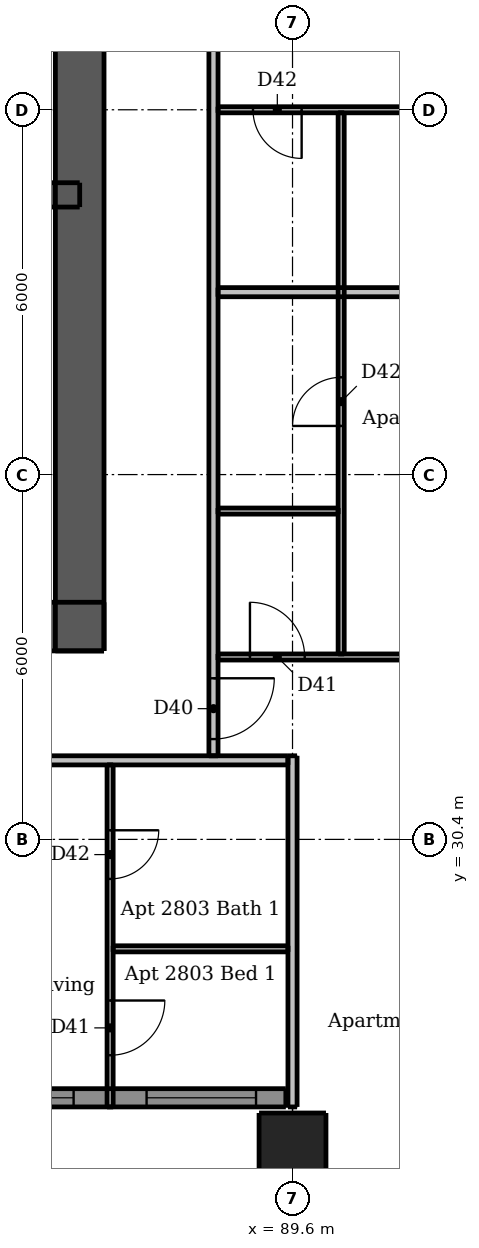
"""IFC4 building model, lengths in metres.
Left out: names, types, materials, properties, quantities, classifications, styles, units other than length and angle.
Written with IfcOpenShell. Run it as: python <this file> out.ifc"""

import sys

from ifc_helpers import new_model, si_unit, direction, frame, frame_2d, origin, origin_2d, place, context, subcontext, project, spatial, rectangle, extrude, element, fill, save


model = new_model("IFC4")
c1 = context("Model", 3, precision=1e-05, world=origin(), true_north=direction((0.0, 1.0)))
c2 = subcontext(c1, "Body", "Model", "MODEL_VIEW")
j1 = project(units=[si_unit("LENGTHUNIT", "METRE"), si_unit("PLANEANGLEUNIT", "RADIAN")], contexts=[c1])
p1 = place(None, origin())
s1 = spatial("IfcSite", under=j1, at=p1, CompositionType="ELEMENT")
p2 = place(p1, origin())
s2 = spatial("IfcBuilding", under=s1, at=p2, CompositionType="ELEMENT")
p3 = place(p2, frame((0.0, 0.0, 105.1)))
s3 = spatial("IfcBuildingStorey", under=s2, at=p3, CompositionType="ELEMENT", Elevation=105.1)
p4 = place(p3, frame((62.5, 33.9, 0.0), z_axis=(0.0, 0.0, 1.0), x_axis=(1.0, 0.0, 0.0)))
e1 = element("IfcWall", 1, at=p4, inside=s3, PredefinedType="SHEAR", context=c2, shape_type="SweptSolid", body=[
    extrude(rectangle(XDim=24.0, YDim=0.8, at=frame_2d((12.0, 0.0))), origin(), (0.0, 0.0, 1.0), 3.05),
])
p5 = place(p4, frame((2.0, 0.0, 0.0)))
e2 = element("IfcOpeningElement", 2, at=p5, cuts=e1, PredefinedType="OPENING", context=c2, shape_type="SweptSolid", body=[
    extrude(rectangle(XDim=1.1, YDim=2.1, at=frame_2d((0.55, 1.05))), frame((0.0, 0.41, 0.0), z_axis=(0.0, -1.0, 0.0), x_axis=(1.0, 0.0, 0.0)), (0.0, 0.0, 1.0), 0.82),
])
p6 = place(p4, frame((20.9, 0.0, 0.0)))
e3 = element("IfcOpeningElement", 3, at=p6, cuts=e1, PredefinedType="OPENING", context=c2, shape_type="SweptSolid", body=[
    extrude(rectangle(XDim=1.1, YDim=2.1, at=frame_2d((0.55, 1.05))), frame((0.0, 0.41, 0.0), z_axis=(0.0, -1.0, 0.0), x_axis=(1.0, 0.0, 0.0)), (0.0, 0.0, 1.0), 0.82),
])
p7 = place(p4, frame((8.0, 0.0, 0.0)))
e4 = element("IfcOpeningElement", 4, at=p7, cuts=e1, PredefinedType="OPENING", context=c2, shape_type="SweptSolid", body=[
    extrude(rectangle(XDim=1.1, YDim=2.1, at=frame_2d((0.55, 1.05))), frame((0.0, 0.41, 0.0), z_axis=(0.0, -1.0, 0.0), x_axis=(1.0, 0.0, 0.0)), (0.0, 0.0, 1.0), 0.82),
])
p8 = place(p4, frame((15.3, 0.0, 0.0)))
e5 = element("IfcOpeningElement", 5, at=p8, cuts=e1, PredefinedType="OPENING", context=c2, shape_type="SweptSolid", body=[
    extrude(rectangle(XDim=0.9, YDim=2.1, at=frame_2d((0.45, 1.05))), frame((0.0, 0.41, 0.0), z_axis=(0.0, -1.0, 0.0), x_axis=(1.0, 0.0, 0.0)), (0.0, 0.0, 1.0), 0.82),
])
p9 = place(p3, frame((86.1, 33.5, 0.0), z_axis=(0.0, 0.0, 1.0), x_axis=(0.0, 1.0, 0.0)))
e6 = element("IfcWall", 6, at=p9, inside=s3, PredefinedType="SHEAR", context=c2, shape_type="SweptSolid", body=[
    extrude(rectangle(XDim=24.0, YDim=0.8, at=frame_2d((12.0, 0.0))), origin(), (0.0, 0.0, 1.0), 3.05),
])
p10 = place(p9, frame((11.2, 0.0, 0.0)))
e7 = element("IfcOpeningElement", 7, at=p10, cuts=e6, PredefinedType="OPENING", context=c2, shape_type="SweptSolid", body=[
    extrude(rectangle(XDim=1.6, YDim=2.1, at=frame_2d((0.8, 1.05))), frame((0.0, 0.41, 0.0), z_axis=(0.0, -1.0, 0.0), x_axis=(1.0, 0.0, 0.0)), (0.0, 0.0, 1.0), 0.82),
])
p11 = place(p3, frame((62.9, 41.0, 0.0), z_axis=(0.0, 0.0, 1.0), x_axis=(1.0, 0.0, 0.0)))
e8 = element("IfcWall", 8, at=p11, inside=s3, PredefinedType="SHEAR", context=c2, shape_type="SweptSolid", body=[
    extrude(rectangle(XDim=23.2, YDim=0.4, at=frame_2d((11.6, 0.0))), origin(), (0.0, 0.0, 1.0), 3.05),
])
p12 = place(p3, frame((89.6, 25.35, 0.0), z_axis=(0.0, 0.0, 1.0), x_axis=(1.0, 0.0, 0.0)))
e9 = element("IfcColumn", 9, at=p12, inside=s3, PredefinedType="COLUMN", context=c2, shape_type="SweptSolid", body=[
    extrude(rectangle(XDim=1.1, YDim=1.1, at=origin_2d()), origin(), (0.0, 0.0, 1.0), 3.05),
])
p13 = place(p3, frame((83.7, 26.15, 0.0), z_axis=(0.0, 0.0, 1.0), x_axis=(1.0, 0.0, 0.0)))
e10 = element("IfcWall", 10, at=p13, inside=s3, PredefinedType="SOLIDWALL", context=c2, shape_type="SweptSolid", body=[
    extrude(rectangle(XDim=5.79, YDim=0.3, at=frame_2d((2.895, 0.0))), origin(), (0.0, 0.0, 1.0), 3.05),
])
p14 = place(p13, frame((0.5, 0.0, 0.15)))
e11 = element("IfcOpeningElement", 11, at=p14, cuts=e10, PredefinedType="OPENING", context=c2, shape_type="SweptSolid", body=[
    extrude(rectangle(XDim=1.8, YDim=2.1, at=frame_2d((0.9, 1.05))), frame((0.0, 0.16, 0.0), z_axis=(0.0, -1.0, 0.0), x_axis=(1.0, 0.0, 0.0)), (0.0, 0.0, 1.0), 0.32),
])
p15 = place(p13, frame((3.5, 0.0, 0.15)))
e12 = element("IfcOpeningElement", 12, at=p15, cuts=e10, PredefinedType="OPENING", context=c2, shape_type="SweptSolid", body=[
    extrude(rectangle(XDim=1.8, YDim=2.1, at=frame_2d((0.9, 1.05))), frame((0.0, 0.16, 0.0), z_axis=(0.0, -1.0, 0.0), x_axis=(1.0, 0.0, 0.0)), (0.0, 0.0, 1.0), 0.32),
])
p16 = place(p3, frame((86.6, 31.625, 0.0), z_axis=(0.0, 0.0, 1.0), x_axis=(0.0, -1.0, 0.0)))
e13 = element("IfcWall", 13, at=p16, inside=s3, PredefinedType="PARTITIONING", context=c2, shape_type="SweptSolid", body=[
    extrude(rectangle(XDim=5.625, YDim=0.1, at=frame_2d((2.812, 0.0))), origin(), (0.0, 0.0, 1.0), 3.05),
])
p17 = place(p16, frame((3.875, 0.0, 0.0)))
e14 = element("IfcOpeningElement", 14, at=p17, cuts=e13, PredefinedType="OPENING", context=c2, shape_type="SweptSolid", body=[
    extrude(rectangle(XDim=0.9, YDim=2.1, at=frame_2d((0.45, 1.05))), frame((0.0, 0.06, 0.0), z_axis=(0.0, -1.0, 0.0), x_axis=(1.0, 0.0, 0.0)), (0.0, 0.0, 1.0), 0.12),
])
p18 = place(p16, frame((1.075, 0.0, 0.0)))
e15 = element("IfcOpeningElement", 15, at=p18, cuts=e13, PredefinedType="OPENING", context=c2, shape_type="SweptSolid", body=[
    extrude(rectangle(XDim=0.8, YDim=2.1, at=frame_2d((0.4, 1.05))), frame((0.0, 0.06, 0.0), z_axis=(0.0, -1.0, 0.0), x_axis=(1.0, 0.0, 0.0)), (0.0, 0.0, 1.0), 0.12),
])
p19 = place(p3, frame((90.4, 33.45, 0.0), z_axis=(0.0, 0.0, 1.0), x_axis=(0.0, 1.0, 0.0)))
e16 = element("IfcWall", 16, at=p19, inside=s3, PredefinedType="PARTITIONING", context=c2, shape_type="SweptSolid", body=[
    extrude(rectangle(XDim=8.9, YDim=0.1, at=frame_2d((4.45, 0.0))), origin(), (0.0, 0.0, 1.0), 3.05),
])
p20 = place(p19, frame((3.75, 0.0, 0.0)))
e17 = element("IfcOpeningElement", 17, at=p20, cuts=e16, PredefinedType="OPENING", context=c2, shape_type="SweptSolid", body=[
    extrude(rectangle(XDim=0.8, YDim=2.1, at=frame_2d((0.4, 1.05))), frame((0.0, 0.06, 0.0), z_axis=(0.0, -1.0, 0.0), x_axis=(1.0, 0.0, 0.0)), (0.0, 0.0, 1.0), 0.12),
])
p21 = place(p3, frame((97.0, 42.4, 0.0), z_axis=(0.0, 0.0, 1.0), x_axis=(-1.0, 0.0, 0.0)))
e18 = element("IfcWall", 18, at=p21, inside=s3, PredefinedType="PARTITIONING", context=c2, shape_type="SweptSolid", body=[
    extrude(rectangle(XDim=8.625, YDim=0.1, at=frame_2d((4.312, 0.0))), origin(), (0.0, 0.0, 1.0), 2.516),
])
p22 = place(p21, frame((2.85, 0.0, 0.0)))
e19 = element("IfcOpeningElement", 19, at=p22, cuts=e18, PredefinedType="OPENING", context=c2, shape_type="SweptSolid", body=[
    extrude(rectangle(XDim=0.9, YDim=2.1, at=frame_2d((0.45, 1.05))), frame((0.0, 0.06, 0.0), z_axis=(0.0, -1.0, 0.0), x_axis=(1.0, 0.0, 0.0)), (0.0, 0.0, 1.0), 0.12),
])
p23 = place(p21, frame((7.25, 0.0, 0.0)))
e20 = element("IfcOpeningElement", 20, at=p23, cuts=e18, PredefinedType="OPENING", context=c2, shape_type="SweptSolid", body=[
    extrude(rectangle(XDim=0.8, YDim=2.1, at=frame_2d((0.4, 1.05))), frame((0.0, 0.06, 0.0), z_axis=(0.0, -1.0, 0.0), x_axis=(1.0, 0.0, 0.0)), (0.0, 0.0, 1.0), 0.12),
])
p24 = place(p3, frame((88.375, 35.8, 0.0), z_axis=(0.0, 0.0, 1.0), x_axis=(1.0, 0.0, 0.0)))
e21 = element("IfcWall", 21, at=p24, inside=s3, PredefinedType="PARTITIONING", context=c2, shape_type="SweptSolid", body=[
    extrude(rectangle(XDim=1.975, YDim=0.1, at=frame_2d((0.988, 0.0))), origin(), (0.0, 0.0, 1.0), 3.05),
])
p25 = place(p3, frame((88.375, 33.4, 0.0), z_axis=(0.0, 0.0, 1.0), x_axis=(1.0, 0.0, 0.0)))
e22 = element("IfcWall", 22, at=p25, inside=s3, PredefinedType="PARTITIONING", context=c2, shape_type="SweptSolid", body=[
    extrude(rectangle(XDim=5.625, YDim=0.1, at=frame_2d((2.812, 0.0))), origin(), (0.0, 0.0, 1.0), 3.05),
])
p26 = place(p25, frame((0.525, 0.0, 0.0)))
e23 = element("IfcOpeningElement", 23, at=p26, cuts=e22, PredefinedType="OPENING", context=c2, shape_type="SweptSolid", body=[
    extrude(rectangle(XDim=0.9, YDim=2.1, at=frame_2d((0.45, 1.05))), frame((0.0, 0.06, 0.0), z_axis=(0.0, -1.0, 0.0), x_axis=(1.0, 0.0, 0.0)), (0.0, 0.0, 1.0), 0.12),
])
p27 = place(p25, frame((3.375, 0.0, 0.0)))
e24 = element("IfcOpeningElement", 24, at=p27, cuts=e22, PredefinedType="OPENING", context=c2, shape_type="SweptSolid", body=[
    extrude(rectangle(XDim=0.9, YDim=2.1, at=frame_2d((0.45, 1.05))), frame((0.0, 0.06, 0.0), z_axis=(0.0, -1.0, 0.0), x_axis=(1.0, 0.0, 0.0)), (0.0, 0.0, 1.0), 0.12),
])
p28 = place(p3, frame((86.65, 28.6, 0.0), z_axis=(0.0, 0.0, 1.0), x_axis=(1.0, 0.0, 0.0)))
e25 = element("IfcWall", 25, at=p28, inside=s3, PredefinedType="PARTITIONING", context=c2, shape_type="SweptSolid", body=[
    extrude(rectangle(XDim=2.875, YDim=0.1, at=frame_2d((1.438, 0.0))), origin(), (0.0, 0.0, 1.0), 3.05),
])
p29 = place(p3, frame((88.3, 60.475, 0.0), z_axis=(0.0, 0.0, 1.0), x_axis=(0.0, -1.0, 0.0)))
e26 = element("IfcWall", 26, at=p29, inside=s3, PredefinedType="PARTITIONING", context=c2, shape_type="SweptSolid", body=[
    extrude(rectangle(XDim=28.7, YDim=0.15, at=frame_2d((14.35, 0.0))), origin(), (0.0, 0.0, 1.0), 3.05),
])
p30 = place(p29, frame((27.425, 0.0, 0.0)))
e27 = element("IfcOpeningElement", 27, at=p30, cuts=e26, PredefinedType="OPENING", context=c2, shape_type="SweptSolid", body=[
    extrude(rectangle(XDim=1.0, YDim=2.1, at=frame_2d((0.5, 1.05))), frame((0.0, 0.085, 0.0), z_axis=(0.0, -1.0, 0.0), x_axis=(1.0, 0.0, 0.0)), (0.0, 0.0, 1.0), 0.17),
])
p31 = place(p29, frame((14.575, 0.0, 0.0)))
e28 = element("IfcOpeningElement", 28, at=p31, cuts=e26, PredefinedType="OPENING", context=c2, shape_type="SweptSolid", body=[
    extrude(rectangle(XDim=1.0, YDim=2.1, at=frame_2d((0.5, 1.05))), frame((0.0, 0.085, 0.0), z_axis=(0.0, -1.0, 0.0), x_axis=(1.0, 0.0, 0.0)), (0.0, 0.0, 1.0), 0.17),
])
p32 = place(p29, frame((3.775, 0.0, 0.0)))
e29 = element("IfcOpeningElement", 29, at=p32, cuts=e26, PredefinedType="OPENING", context=c2, shape_type="SweptSolid", body=[
    extrude(rectangle(XDim=1.0, YDim=2.1, at=frame_2d((0.5, 1.05))), frame((0.0, 0.085, 0.0), z_axis=(0.0, -1.0, 0.0), x_axis=(1.0, 0.0, 0.0)), (0.0, 0.0, 1.0), 0.17),
])
p33 = place(p3, frame((89.6, 26.0, 0.0), z_axis=(0.0, 0.0, 1.0), x_axis=(0.0, 1.0, 0.0)))
e30 = element("IfcWall", 30, at=p33, inside=s3, PredefinedType="PARTITIONING", context=c2, shape_type="SweptSolid", body=[
    extrude(rectangle(XDim=5.775, YDim=0.15, at=frame_2d((2.887, 0.0))), origin(), (0.0, 0.0, 1.0), 2.516),
])
p34 = place(p3, frame((88.375, 39.4, 0.0), z_axis=(0.0, 0.0, 1.0), x_axis=(1.0, 0.0, 0.0)))
e31 = element("IfcWall", 31, at=p34, inside=s3, PredefinedType="PARTITIONING", context=c2, shape_type="SweptSolid", body=[
    extrude(rectangle(XDim=8.625, YDim=0.15, at=frame_2d((4.312, 0.0))), origin(), (0.0, 0.0, 1.0), 3.05),
])
p35 = place(p3, frame((89.525, 31.7, 0.0), z_axis=(0.0, 0.0, 1.0), x_axis=(-1.0, 0.0, 0.0)))
e32 = element("IfcWall", 32, at=p35, inside=s3, PredefinedType="PARTITIONING", context=c2, shape_type="SweptSolid", body=[
    extrude(rectangle(XDim=28.75, YDim=0.15, at=frame_2d((14.375, 0.0))), origin(), (0.0, 0.0, 1.0), 3.05),
])
p36 = place(p35, frame((25.875, 0.0, 0.0)))
e33 = element("IfcOpeningElement", 33, at=p36, cuts=e32, PredefinedType="OPENING", context=c2, shape_type="SweptSolid", body=[
    extrude(rectangle(XDim=1.0, YDim=2.1, at=frame_2d((0.5, 1.05))), frame((0.0, 0.085, 0.0), z_axis=(0.0, -1.0, 0.0), x_axis=(1.0, 0.0, 0.0)), (0.0, 0.0, 1.0), 0.17),
])
p37 = place(p35, frame((12.525, 0.0, 0.0)))
e34 = element("IfcOpeningElement", 34, at=p37, cuts=e32, PredefinedType="OPENING", context=c2, shape_type="SweptSolid", body=[
    extrude(rectangle(XDim=1.0, YDim=2.1, at=frame_2d((0.5, 1.05))), frame((0.0, 0.085, 0.0), z_axis=(0.0, -1.0, 0.0), x_axis=(1.0, 0.0, 0.0)), (0.0, 0.0, 1.0), 0.17),
])
p38 = place(p35, frame((4.175, 0.0, 0.0)))
e35 = element("IfcOpeningElement", 35, at=p38, cuts=e32, PredefinedType="OPENING", context=c2, shape_type="SweptSolid", body=[
    extrude(rectangle(XDim=1.0, YDim=2.1, at=frame_2d((0.5, 1.05))), frame((0.0, 0.085, 0.0), z_axis=(0.0, -1.0, 0.0), x_axis=(1.0, 0.0, 0.0)), (0.0, 0.0, 1.0), 0.17),
])
p39 = place(p14, origin())
e36 = element("IfcWindow", 36, at=p39, inside=s3, PartitioningType="DOUBLE_PANEL_VERTICAL", PredefinedType="WINDOW", context=c2, shape_type="SweptSolid", body=[
    extrude(rectangle(XDim=1.8, YDim=2.1, at=frame_2d((0.9, 1.05))), frame((0.0, 0.03, 0.0), z_axis=(0.0, -1.0, 0.0), x_axis=(1.0, 0.0, 0.0)), (0.0, 0.0, 1.0), 0.06),
])
fill(e11, e36)
p40 = place(p15, origin())
e37 = element("IfcWindow", 37, at=p40, inside=s3, PartitioningType="DOUBLE_PANEL_VERTICAL", PredefinedType="WINDOW", context=c2, shape_type="SweptSolid", body=[
    extrude(rectangle(XDim=1.8, YDim=2.1, at=frame_2d((0.9, 1.05))), frame((0.0, 0.03, 0.0), z_axis=(0.0, -1.0, 0.0), x_axis=(1.0, 0.0, 0.0)), (0.0, 0.0, 1.0), 0.06),
])
fill(e12, e37)
p41 = place(p17, origin())
e38 = element("IfcDoor", 38, at=p41, inside=s3, OperationType="SINGLE_SWING_LEFT", PredefinedType="DOOR", context=c2, shape_type="SweptSolid", body=[
    extrude(rectangle(XDim=0.9, YDim=2.1, at=frame_2d((0.45, 1.05))), frame((0.0, 0.025, 0.0), z_axis=(0.0, -1.0, 0.0), x_axis=(1.0, 0.0, 0.0)), (0.0, 0.0, 1.0), 0.05),
])
fill(e14, e38)
p42 = place(p18, origin())
e39 = element("IfcDoor", 39, at=p42, inside=s3, OperationType="SINGLE_SWING_LEFT", PredefinedType="DOOR", context=c2, shape_type="SweptSolid", body=[
    extrude(rectangle(XDim=0.8, YDim=2.1, at=frame_2d((0.4, 1.05))), frame((0.0, 0.025, 0.0), z_axis=(0.0, -1.0, 0.0), x_axis=(1.0, 0.0, 0.0)), (0.0, 0.0, 1.0), 0.05),
])
fill(e15, e39)
p43 = place(p30, origin())
e40 = element("IfcDoor", 40, at=p43, inside=s3, OperationType="SINGLE_SWING_LEFT", PredefinedType="DOOR", context=c2, shape_type="SweptSolid", body=[
    extrude(rectangle(XDim=1.0, YDim=2.1, at=frame_2d((0.5, 1.05))), frame((0.0, 0.025, 0.0), z_axis=(0.0, -1.0, 0.0), x_axis=(1.0, 0.0, 0.0)), (0.0, 0.0, 1.0), 0.05),
])
fill(e27, e40)
p44 = place(p26, origin())
e41 = element("IfcDoor", 41, at=p44, inside=s3, OperationType="SINGLE_SWING_LEFT", PredefinedType="DOOR", context=c2, shape_type="SweptSolid", body=[
    extrude(rectangle(XDim=0.9, YDim=2.1, at=frame_2d((0.45, 1.05))), frame((0.0, 0.025, 0.0), z_axis=(0.0, -1.0, 0.0), x_axis=(1.0, 0.0, 0.0)), (0.0, 0.0, 1.0), 0.05),
])
fill(e23, e41)
p45 = place(p20, origin())
e42 = element("IfcDoor", 42, at=p45, inside=s3, OperationType="SINGLE_SWING_LEFT", PredefinedType="DOOR", context=c2, shape_type="SweptSolid", body=[
    extrude(rectangle(XDim=0.8, YDim=2.1, at=frame_2d((0.4, 1.05))), frame((0.0, 0.025, 0.0), z_axis=(0.0, -1.0, 0.0), x_axis=(1.0, 0.0, 0.0)), (0.0, 0.0, 1.0), 0.05),
])
fill(e17, e42)
p46 = place(p23, origin())
e43 = element("IfcDoor", 43, at=p46, inside=s3, OperationType="SINGLE_SWING_LEFT", PredefinedType="DOOR", context=c2, shape_type="SweptSolid", body=[
    extrude(rectangle(XDim=0.8, YDim=2.1, at=frame_2d((0.4, 1.05))), frame((0.0, 0.025, 0.0), z_axis=(0.0, -1.0, 0.0), x_axis=(1.0, 0.0, 0.0)), (0.0, 0.0, 1.0), 0.05),
])
fill(e20, e43)
save(model, sys.argv[1])
